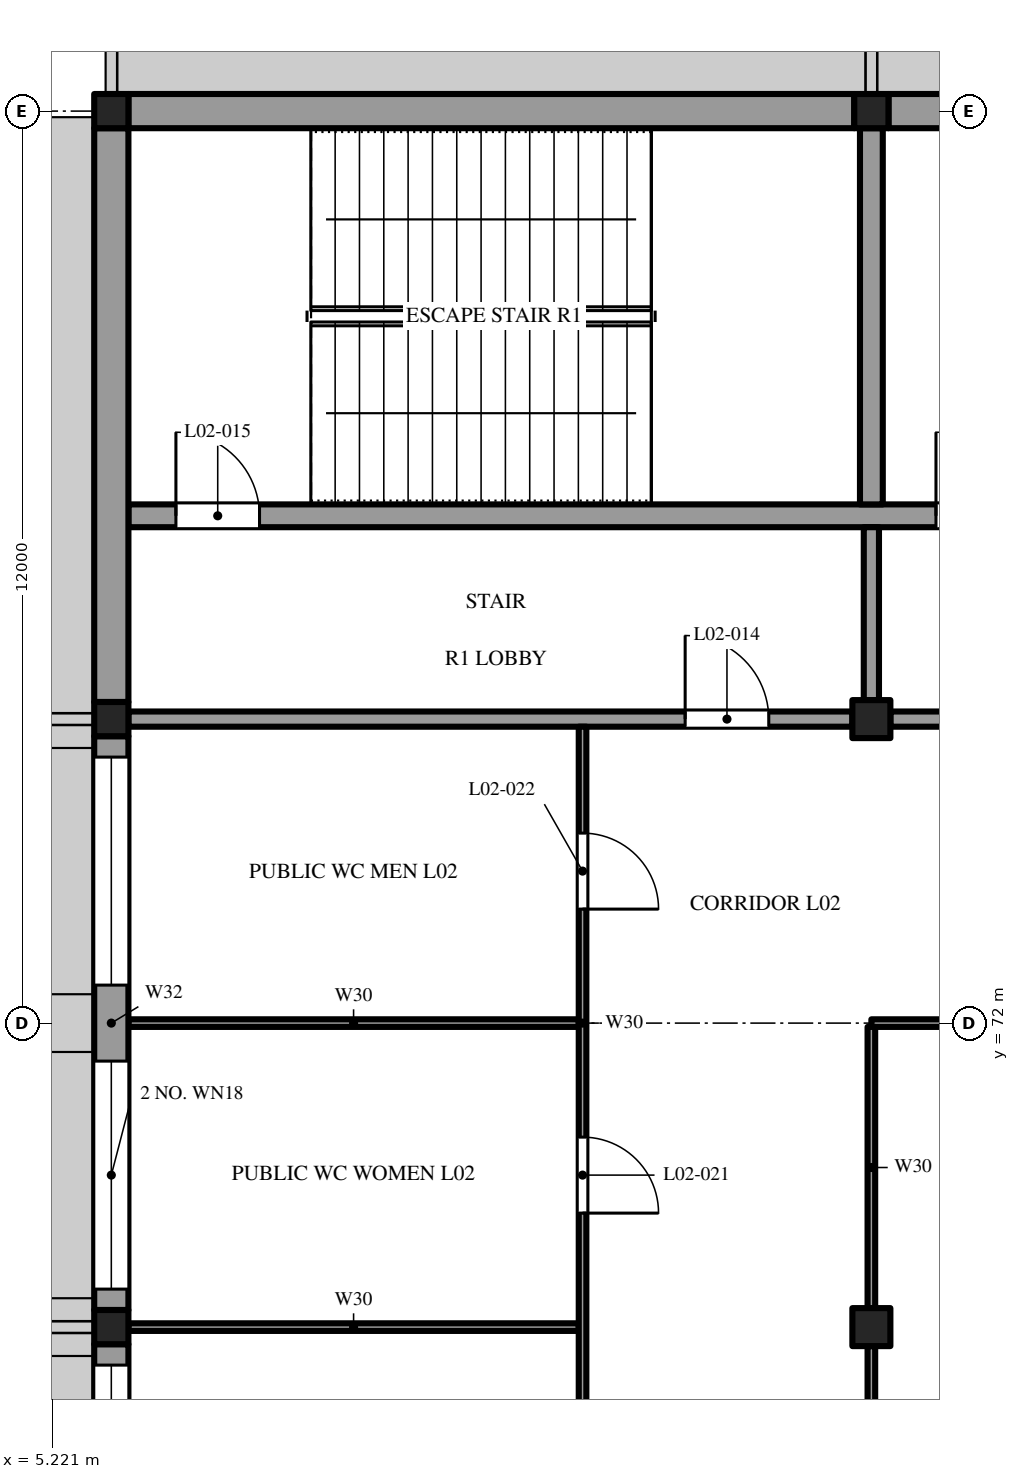
"""IFC4 building model, lengths in metres.
Left out: names, types, materials, properties, quantities, classifications, styles, units other than length and angle.
Written with IfcOpenShell. Run it as: python <this file> out.ifc"""

import sys

from ifc_helpers import new_model, si_unit, direction, frame, frame_2d, origin, origin_2d, place, context, subcontext, project, spatial, rectangle, extrude, element, fill, save


model = new_model("IFC4")
c1 = context("Model", 3, precision=1e-05, world=origin(), true_north=direction((0.0, 1.0)))
c2 = subcontext(c1, "Body", "Model", "MODEL_VIEW")
j1 = project(units=[si_unit("LENGTHUNIT", "METRE"), si_unit("PLANEANGLEUNIT", "RADIAN")], contexts=[c1])
p1 = place(None, origin())
s1 = spatial("IfcSite", under=j1, at=p1, CompositionType="ELEMENT")
p2 = place(p1, origin())
s2 = spatial("IfcBuilding", under=s1, at=p2, CompositionType="ELEMENT")
p3 = place(p2, frame((0.0, 0.0, 12.0)))
s3 = spatial("IfcBuildingStorey", under=s2, at=p3, CompositionType="ELEMENT", Elevation=12.0)
for number, where, z_axis, x_axis in (
    (1, (6.0, 68.0, 0.0), (0.0, 0.0, 1.0), (1.0, 0.0, 0.0)),
    (2, (6.0, 76.0, 0.0), (0.0, 0.0, 1.0), (1.0, 0.0, 0.0)),
    (3, (6.0, 84.0, 0.0), (0.0, 0.0, 1.0), (1.0, 0.0, 0.0)),
):
    element("IfcColumn", number, at=place(p3, frame(where, z_axis=z_axis, x_axis=x_axis)), inside=s3, PredefinedType="COLUMN", context=c2, shape_type="SweptSolid", body=[
        extrude(rectangle(XDim=0.45, YDim=0.45, at=origin_2d()), origin(), (0.0, 0.0, 1.0), 4.8),
    ])
for number, where, z_axis, x_axis in (
    (4, (16.0, 68.0, 0.0), (0.0, 0.0, 1.0), (1.0, 0.0, 0.0)),
    (5, (16.0, 76.0, 0.0), (0.0, 0.0, 1.0), (1.0, 0.0, 0.0)),
):
    element("IfcColumn", number, at=place(p3, frame(where, z_axis=z_axis, x_axis=x_axis)), inside=s3, PredefinedType="COLUMN", context=c2, shape_type="SweptSolid", body=[
        extrude(rectangle(XDim=0.5, YDim=0.5, at=origin_2d()), origin(), (0.0, 0.0, 1.0), 4.8),
    ])
p4 = place(p3, frame((16.0, 84.0, 0.0), z_axis=(0.0, 0.0, 1.0), x_axis=(1.0, 0.0, 0.0)))
e6 = element("IfcColumn", 6, at=p4, inside=s3, PredefinedType="COLUMN", context=c2, shape_type="SweptSolid", body=[
    extrude(rectangle(XDim=0.45, YDim=0.45, at=origin_2d()), origin(), (0.0, 0.0, 1.0), 4.8),
])
for number, where, z_axis, x_axis in (
    (7, (6.225, 68.0, 0.0), (0.0, 0.0, 1.0), (1.0, 0.0, 0.0)),
    (8, (6.225, 72.0, 0.0), (0.0, 0.0, 1.0), (1.0, 0.0, 0.0)),
):
    element("IfcWall", number, at=place(p3, frame(where, z_axis=z_axis, x_axis=x_axis)), inside=s3, PredefinedType="PARTITIONING", context=c2, shape_type="SweptSolid", body=[
        extrude(rectangle(XDim=5.925, YDim=0.1, at=frame_2d((2.962, 0.0))), origin(), (0.0, 0.0, 1.0), 4.45),
    ])
p5 = place(p3, frame((16.0, 72.0, 0.0), z_axis=(0.0, 0.0, 1.0), x_axis=(1.0, 0.0, 0.0)))
e9 = element("IfcWall", 9, at=p5, inside=s3, PredefinedType="PARTITIONING", context=c2, shape_type="SweptSolid", body=[
    extrude(rectangle(XDim=29.775, YDim=0.1, at=frame_2d((14.887, 0.0))), origin(), (0.0, 0.0, 1.0), 4.45),
])
p6 = place(p5, frame((14.1, 0.0, 0.0)))
e10 = element("IfcOpeningElement", 10, at=p6, cuts=e9, PredefinedType="OPENING", context=c2, shape_type="SweptSolid", body=[
    extrude(rectangle(XDim=1.8, YDim=2.1, at=frame_2d((0.9, 1.05))), frame((0.0, 0.06, 0.0), z_axis=(0.0, -1.0, 0.0), x_axis=(1.0, 0.0, 0.0)), (0.0, 0.0, 1.0), 0.12),
])
p7 = place(p3, frame((6.225, 76.0, 0.0), z_axis=(0.0, 0.0, 1.0), x_axis=(1.0, 0.0, 0.0)))
e11 = element("IfcWall", 11, at=p7, inside=s3, PredefinedType="SOLIDWALL", context=c2, shape_type="SweptSolid", body=[
    extrude(rectangle(XDim=9.525, YDim=0.2, at=frame_2d((4.762, 0.0))), origin(), (0.0, 0.0, 1.0), 4.45),
])
p8 = place(p7, frame((7.325, 0.0, 0.0)))
e12 = element("IfcOpeningElement", 12, at=p8, cuts=e11, PredefinedType="OPENING", context=c2, shape_type="SweptSolid", body=[
    extrude(rectangle(XDim=1.1, YDim=2.1, at=frame_2d((0.55, 1.05))), frame((0.0, 0.11, 0.0), z_axis=(0.0, -1.0, 0.0), x_axis=(1.0, 0.0, 0.0)), (0.0, 0.0, 1.0), 0.22),
])
p9 = place(p3, frame((16.25, 76.0, 0.0), z_axis=(0.0, 0.0, 1.0), x_axis=(1.0, 0.0, 0.0)))
e13 = element("IfcWall", 13, at=p9, inside=s3, PredefinedType="SOLIDWALL", context=c2, shape_type="SweptSolid", body=[
    extrude(rectangle(XDim=9.5, YDim=0.2, at=frame_2d((4.75, 0.0))), origin(), (0.0, 0.0, 1.0), 4.45),
])
p10 = place(p9, frame((4.2, 0.0, 0.0)))
e14 = element("IfcOpeningElement", 14, at=p10, cuts=e13, PredefinedType="OPENING", context=c2, shape_type="SweptSolid", body=[
    extrude(rectangle(XDim=1.1, YDim=2.1, at=frame_2d((0.55, 1.05))), frame((0.0, 0.11, 0.0), z_axis=(0.0, -1.0, 0.0), x_axis=(1.0, 0.0, 0.0)), (0.0, 0.0, 1.0), 0.22),
])
p11 = place(p3, frame((6.225, 78.675, 0.0), z_axis=(0.0, 0.0, 1.0), x_axis=(1.0, 0.0, 0.0)))
e15 = element("IfcWall", 15, at=p11, inside=s3, PredefinedType="SHEAR", context=c2, shape_type="SweptSolid", body=[
    extrude(rectangle(XDim=19.775, YDim=0.3, at=frame_2d((9.887, 0.0))), origin(), (0.0, 0.0, 1.0), 4.45),
])
p12 = place(p11, frame((0.625, 0.0, 0.0)))
e16 = element("IfcOpeningElement", 16, at=p12, cuts=e15, PredefinedType="OPENING", context=c2, shape_type="SweptSolid", body=[
    extrude(rectangle(XDim=1.1, YDim=2.1, at=frame_2d((0.55, 1.05))), frame((0.0, 0.16, 0.0), z_axis=(0.0, -1.0, 0.0), x_axis=(1.0, 0.0, 0.0)), (0.0, 0.0, 1.0), 0.32),
])
p13 = place(p11, frame((10.625, 0.0, 0.0)))
e17 = element("IfcOpeningElement", 17, at=p13, cuts=e15, PredefinedType="OPENING", context=c2, shape_type="SweptSolid", body=[
    extrude(rectangle(XDim=1.1, YDim=2.1, at=frame_2d((0.55, 1.05))), frame((0.0, 0.16, 0.0), z_axis=(0.0, -1.0, 0.0), x_axis=(1.0, 0.0, 0.0)), (0.0, 0.0, 1.0), 0.32),
])
for number, where, z_axis, x_axis in (
    (18, (15.775, 84.0, 0.0), (0.0, 0.0, 1.0), (-1.0, 0.0, 0.0)),
    (19, (25.775, 84.0, 0.0), (0.0, 0.0, 1.0), (-1.0, 0.0, 0.0)),
):
    element("IfcWall", number, at=place(p3, frame(where, z_axis=z_axis, x_axis=x_axis)), inside=s3, PredefinedType="SOLIDWALL", context=c2, shape_type="SweptSolid", body=[
        extrude(rectangle(XDim=9.55, YDim=0.45, at=frame_2d((4.775, 0.0))), origin(), (0.0, 0.0, 1.0), 4.45),
    ])
p14 = place(p3, frame((6.0, 67.775, 0.0), z_axis=(0.0, 0.0, 1.0), x_axis=(0.0, -1.0, 0.0)))
e20 = element("IfcWall", 20, at=p14, inside=s3, PredefinedType="SOLIDWALL", context=c2, shape_type="SweptSolid", body=[
    extrude(rectangle(XDim=7.55, YDim=0.45, at=frame_2d((3.775, 0.0))), origin(), (0.0, 0.0, 1.0), 4.45),
])
p15 = place(p14, frame((4.275, 0.0, 0.6)))
e21 = element("IfcOpeningElement", 21, at=p15, cuts=e20, PredefinedType="OPENING", context=c2, shape_type="SweptSolid", body=[
    extrude(rectangle(XDim=3.0, YDim=3.2, at=frame_2d((1.5, 1.6))), frame((0.0, 0.235, 0.0), z_axis=(0.0, -1.0, 0.0), x_axis=(1.0, 0.0, 0.0)), (0.0, 0.0, 1.0), 0.47),
])
p16 = place(p14, frame((0.275, 0.0, 0.6)))
e22 = element("IfcOpeningElement", 22, at=p16, cuts=e20, PredefinedType="OPENING", context=c2, shape_type="SweptSolid", body=[
    extrude(rectangle(XDim=3.0, YDim=3.2, at=frame_2d((1.5, 1.6))), frame((0.0, 0.235, 0.0), z_axis=(0.0, -1.0, 0.0), x_axis=(1.0, 0.0, 0.0)), (0.0, 0.0, 1.0), 0.47),
])
p17 = place(p3, frame((6.0, 75.775, 0.0), z_axis=(0.0, 0.0, 1.0), x_axis=(0.0, -1.0, 0.0)))
e23 = element("IfcWall", 23, at=p17, inside=s3, PredefinedType="SOLIDWALL", context=c2, shape_type="SweptSolid", body=[
    extrude(rectangle(XDim=7.55, YDim=0.45, at=frame_2d((3.775, 0.0))), origin(), (0.0, 0.0, 1.0), 4.45),
])
p18 = place(p17, frame((4.275, 0.0, 0.6)))
e24 = element("IfcOpeningElement", 24, at=p18, cuts=e23, PredefinedType="OPENING", context=c2, shape_type="SweptSolid", body=[
    extrude(rectangle(XDim=3.0, YDim=3.2, at=frame_2d((1.5, 1.6))), frame((0.0, 0.235, 0.0), z_axis=(0.0, -1.0, 0.0), x_axis=(1.0, 0.0, 0.0)), (0.0, 0.0, 1.0), 0.47),
])
p19 = place(p17, frame((0.275, 0.0, 0.6)))
e25 = element("IfcOpeningElement", 25, at=p19, cuts=e23, PredefinedType="OPENING", context=c2, shape_type="SweptSolid", body=[
    extrude(rectangle(XDim=3.0, YDim=3.2, at=frame_2d((1.5, 1.6))), frame((0.0, 0.235, 0.0), z_axis=(0.0, -1.0, 0.0), x_axis=(1.0, 0.0, 0.0)), (0.0, 0.0, 1.0), 0.47),
])
p20 = place(p3, frame((6.0, 83.775, 0.0), z_axis=(0.0, 0.0, 1.0), x_axis=(0.0, -1.0, 0.0)))
e26 = element("IfcWall", 26, at=p20, inside=s3, PredefinedType="SOLIDWALL", context=c2, shape_type="SweptSolid", body=[
    extrude(rectangle(XDim=7.55, YDim=0.45, at=frame_2d((3.775, 0.0))), origin(), (0.0, 0.0, 1.0), 4.45),
])
p21 = place(p3, frame((12.2, 64.1, 0.0), z_axis=(0.0, 0.0, 1.0), x_axis=(0.0, 1.0, 0.0)))
e27 = element("IfcWall", 27, at=p21, inside=s3, PredefinedType="PARTITIONING", context=c2, shape_type="SweptSolid", body=[
    extrude(rectangle(XDim=11.8, YDim=0.1, at=frame_2d((5.9, 0.0))), origin(), (0.0, 0.0, 1.0), 4.45),
])
p22 = place(p21, frame((1.35, 0.0, 0.0)))
e28 = element("IfcOpeningElement", 28, at=p22, cuts=e27, PredefinedType="OPENING", context=c2, shape_type="SweptSolid", body=[
    extrude(rectangle(XDim=1.1, YDim=2.1, at=frame_2d((0.55, 1.05))), frame((0.0, 0.06, 0.0), z_axis=(0.0, -1.0, 0.0), x_axis=(1.0, 0.0, 0.0)), (0.0, 0.0, 1.0), 0.12),
])
p23 = place(p21, frame((5.4, 0.0, 0.0)))
e29 = element("IfcOpeningElement", 29, at=p23, cuts=e27, PredefinedType="OPENING", context=c2, shape_type="SweptSolid", body=[
    extrude(rectangle(XDim=1.0, YDim=2.1, at=frame_2d((0.5, 1.05))), frame((0.0, 0.06, 0.0), z_axis=(0.0, -1.0, 0.0), x_axis=(1.0, 0.0, 0.0)), (0.0, 0.0, 1.0), 0.12),
])
p24 = place(p21, frame((9.4, 0.0, 0.0)))
e30 = element("IfcOpeningElement", 30, at=p24, cuts=e27, PredefinedType="OPENING", context=c2, shape_type="SweptSolid", body=[
    extrude(rectangle(XDim=1.0, YDim=2.1, at=frame_2d((0.5, 1.05))), frame((0.0, 0.06, 0.0), z_axis=(0.0, -1.0, 0.0), x_axis=(1.0, 0.0, 0.0)), (0.0, 0.0, 1.0), 0.12),
])
p25 = place(p3, frame((16.0, 64.1, 0.0), z_axis=(0.0, 0.0, 1.0), x_axis=(0.0, 1.0, 0.0)))
e31 = element("IfcWall", 31, at=p25, inside=s3, PredefinedType="PARTITIONING", context=c2, shape_type="SweptSolid", body=[
    extrude(rectangle(XDim=3.65, YDim=0.1, at=frame_2d((1.825, 0.0))), origin(), (0.0, 0.0, 1.0), 4.45),
])
p26 = place(p3, frame((16.0, 68.25, 0.0), z_axis=(0.0, 0.0, 1.0), x_axis=(0.0, 1.0, 0.0)))
e32 = element("IfcWall", 32, at=p26, inside=s3, PredefinedType="PARTITIONING", context=c2, shape_type="SweptSolid", body=[
    extrude(rectangle(XDim=3.7, YDim=0.1, at=frame_2d((1.85, 0.0))), origin(), (0.0, 0.0, 1.0), 4.45),
])
p27 = place(p3, frame((16.0, 76.25, 0.0), z_axis=(0.0, 0.0, 1.0), x_axis=(0.0, 1.0, 0.0)))
e33 = element("IfcWall", 33, at=p27, inside=s3, PredefinedType="SOLIDWALL", context=c2, shape_type="SweptSolid", body=[
    extrude(rectangle(XDim=2.275, YDim=0.2, at=frame_2d((1.137, 0.0))), origin(), (0.0, 0.0, 1.0), 4.45),
])
p28 = place(p3, frame((16.0, 78.825, 0.0), z_axis=(0.0, 0.0, 1.0), x_axis=(0.0, 1.0, 0.0)))
e34 = element("IfcWall", 34, at=p28, inside=s3, PredefinedType="SHEAR", context=c2, shape_type="SweptSolid", body=[
    extrude(rectangle(XDim=4.95, YDim=0.3, at=frame_2d((2.475, 0.0))), origin(), (0.0, 0.0, 1.0), 4.45),
])
p29 = place(p8, origin())
e35 = element("IfcDoor", 35, at=p29, inside=s3, OperationType="SINGLE_SWING_LEFT", PredefinedType="DOOR", context=c2, shape_type="SweptSolid", body=[
    extrude(rectangle(XDim=1.1, YDim=2.1, at=frame_2d((0.55, 1.05))), frame((0.0, 0.025, 0.0), z_axis=(0.0, -1.0, 0.0), x_axis=(1.0, 0.0, 0.0)), (0.0, 0.0, 1.0), 0.05),
])
fill(e12, e35)
p30 = place(p12, origin())
e36 = element("IfcDoor", 36, at=p30, inside=s3, OperationType="SINGLE_SWING_RIGHT", PredefinedType="DOOR", context=c2, shape_type="SweptSolid", body=[
    extrude(rectangle(XDim=1.1, YDim=2.1, at=frame_2d((0.55, 1.05))), frame((0.0, 0.025, 0.0), z_axis=(0.0, -1.0, 0.0), x_axis=(1.0, 0.0, 0.0)), (0.0, 0.0, 1.0), 0.05),
])
fill(e16, e36)
p31 = place(p13, origin())
e37 = element("IfcDoor", 37, at=p31, inside=s3, OperationType="SINGLE_SWING_RIGHT", PredefinedType="DOOR", context=c2, shape_type="SweptSolid", body=[
    extrude(rectangle(XDim=1.1, YDim=2.1, at=frame_2d((0.55, 1.05))), frame((0.0, 0.025, 0.0), z_axis=(0.0, -1.0, 0.0), x_axis=(1.0, 0.0, 0.0)), (0.0, 0.0, 1.0), 0.05),
])
fill(e17, e37)
p32 = place(p23, frame((1.0, 0.0, 0.0), z_axis=(0.0, 0.0, 1.0), x_axis=(-1.0, 0.0, 0.0)))
e38 = element("IfcDoor", 38, at=p32, inside=s3, OperationType="SINGLE_SWING_LEFT", PredefinedType="DOOR", context=c2, shape_type="SweptSolid", body=[
    extrude(rectangle(XDim=1.0, YDim=2.1, at=frame_2d((0.5, 1.05))), frame((0.0, 0.025, 0.0), z_axis=(0.0, -1.0, 0.0), x_axis=(1.0, 0.0, 0.0)), (0.0, 0.0, 1.0), 0.05),
])
fill(e29, e38)
p33 = place(p24, frame((1.0, 0.0, 0.0), z_axis=(0.0, 0.0, 1.0), x_axis=(-1.0, 0.0, 0.0)))
e39 = element("IfcDoor", 39, at=p33, inside=s3, OperationType="SINGLE_SWING_RIGHT", PredefinedType="DOOR", context=c2, shape_type="SweptSolid", body=[
    extrude(rectangle(XDim=1.0, YDim=2.1, at=frame_2d((0.5, 1.05))), frame((0.0, 0.025, 0.0), z_axis=(0.0, -1.0, 0.0), x_axis=(1.0, 0.0, 0.0)), (0.0, 0.0, 1.0), 0.05),
])
fill(e30, e39)
p34 = place(p16, origin())
e40 = element("IfcWindow", 40, at=p34, inside=s3, PartitioningType="SINGLE_PANEL", PredefinedType="WINDOW", context=c2, shape_type="SweptSolid", body=[
    extrude(rectangle(XDim=3.0, YDim=3.2, at=frame_2d((1.5, 1.6))), frame((0.0, 0.215, 0.0), z_axis=(0.0, -1.0, 0.0), x_axis=(1.0, 0.0, 0.0)), (0.0, 0.0, 1.0), 0.06),
])
fill(e22, e40)
p35 = place(p18, origin())
e41 = element("IfcWindow", 41, at=p35, inside=s3, PartitioningType="SINGLE_PANEL", PredefinedType="WINDOW", context=c2, shape_type="SweptSolid", body=[
    extrude(rectangle(XDim=3.0, YDim=3.2, at=frame_2d((1.5, 1.6))), frame((0.0, 0.215, 0.0), z_axis=(0.0, -1.0, 0.0), x_axis=(1.0, 0.0, 0.0)), (0.0, 0.0, 1.0), 0.06),
])
fill(e24, e41)
p36 = place(p19, origin())
e42 = element("IfcWindow", 42, at=p36, inside=s3, PartitioningType="SINGLE_PANEL", PredefinedType="WINDOW", context=c2, shape_type="SweptSolid", body=[
    extrude(rectangle(XDim=3.0, YDim=3.2, at=frame_2d((1.5, 1.6))), frame((0.0, 0.215, 0.0), z_axis=(0.0, -1.0, 0.0), x_axis=(1.0, 0.0, 0.0)), (0.0, 0.0, 1.0), 0.06),
])
fill(e25, e42)
save(model, sys.argv[1])
